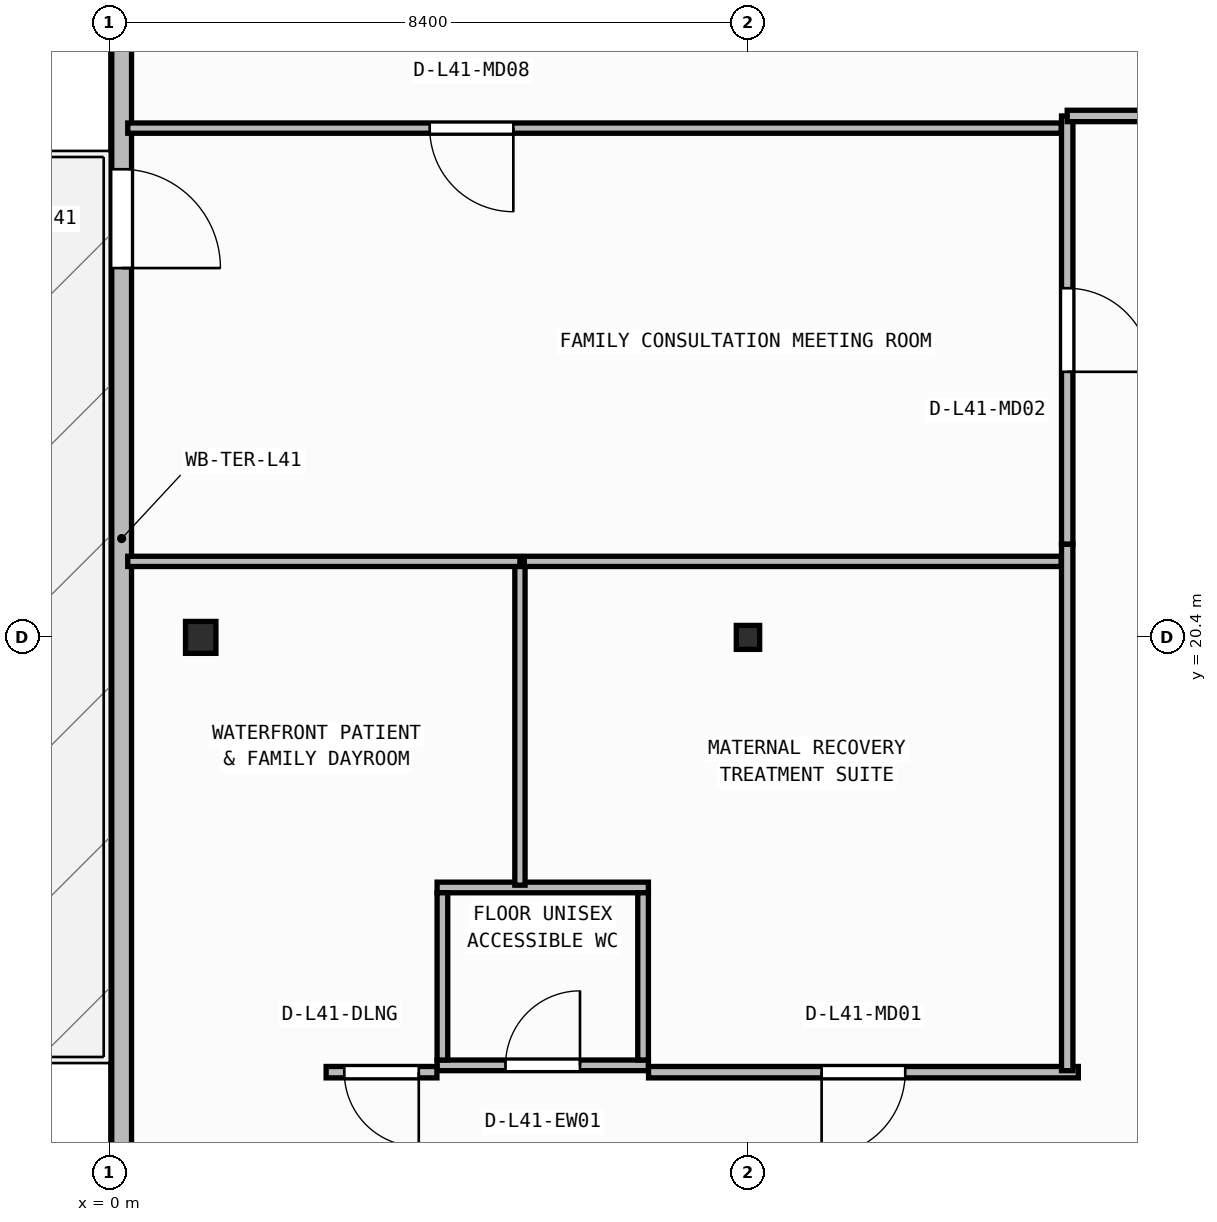
"""IFC4 building model, lengths in metres.
Left out: names, types, materials, properties, quantities, classifications, styles, units other than length and angle.
Written with IfcOpenShell. Run it as: python <this file> out.ifc"""

import sys

from ifc_helpers import new_model, si_unit, direction, frame, frame_2d, origin, origin_2d, place, context, subcontext, project, spatial, rectangle, i_section, extrude, element, fill, save


model = new_model("IFC4")
c1 = context("Model", 3, precision=1e-05, world=origin(), true_north=direction((0.0, 1.0)))
c2 = subcontext(c1, "Body", "Model", "MODEL_VIEW")
j1 = project(units=[si_unit("LENGTHUNIT", "METRE"), si_unit("PLANEANGLEUNIT", "RADIAN")], contexts=[c1])
p1 = place(None, origin())
s1 = spatial("IfcSite", under=j1, at=p1, CompositionType="ELEMENT")
p2 = place(p1, origin())
s2 = spatial("IfcBuilding", under=s1, at=p2, CompositionType="ELEMENT")
p3 = place(p2, frame((0.0, 0.0, 166.55)))
s3 = spatial("IfcBuildingStorey", under=s2, at=p3, CompositionType="ELEMENT", Elevation=166.55)
p4 = place(p3, frame((1.2, 20.4, 0.0), z_axis=(0.0, 0.0, 1.0), x_axis=(1.0, 0.0, 0.0)))
e1 = element("IfcColumn", 1, at=p4, inside=s3, PredefinedType="COLUMN", context=c2, shape_type="SweptSolid", body=[
    extrude(i_section(OverallWidth=0.4, OverallDepth=0.42, WebThickness=0.025, FlangeThickness=0.04, at=origin_2d()), origin(), (0.0, 0.0, 1.0), 3.95),
])
p5 = place(p3, frame((8.4, 20.4, 0.0), z_axis=(0.0, 0.0, 1.0), x_axis=(1.0, 0.0, 0.0)))
e2 = element("IfcColumn", 2, at=p5, inside=s3, PredefinedType="COLUMN", context=c2, shape_type="SweptSolid", body=[
    extrude(i_section(OverallWidth=0.307, OverallDepth=0.315, WebThickness=0.012, FlangeThickness=0.019, FilletRadius=0.017, at=origin_2d()), origin(), (0.0, 0.0, 1.0), 3.95),
])
p6 = place(p3, frame((0.16, 40.64, 0.0), z_axis=(0.0, 0.0, 1.0), x_axis=(0.0, -1.0, 0.0)))
e3 = element("IfcWall", 3, at=p6, inside=s3, PredefinedType="STANDARD", context=c2, shape_type="SweptSolid", body=[
    extrude(rectangle(XDim=37.88, YDim=0.26, at=frame_2d((18.94, 0.0))), origin(), (0.0, 0.0, 1.0), 3.71),
])
p7 = place(p6, frame((14.081, 0.0, 0.0)))
e4 = element("IfcOpeningElement", 4, at=p7, cuts=e3, PredefinedType="OPENING", context=c2, shape_type="SweptSolid", body=[
    extrude(rectangle(XDim=1.3, YDim=2.15, at=frame_2d((0.65, 1.075))), frame((0.0, 0.14, 0.0), z_axis=(0.0, -1.0, 0.0), x_axis=(1.0, 0.0, 0.0)), (0.0, 0.0, 1.0), 0.28),
])
p8 = place(p3, frame((4.31, 14.77, 0.0), z_axis=(0.0, 0.0, 1.0), x_axis=(1.0, 0.0, 0.0)))
e5 = element("IfcWall", 5, at=p8, inside=s3, PredefinedType="PARTITIONING", context=c2, shape_type="SweptSolid", body=[
    extrude(rectangle(XDim=2.78, YDim=0.14, at=frame_2d((1.39, 0.0))), origin(), (0.0, 0.0, 1.0), 3.71),
])
p9 = place(p8, frame((0.9, 0.0, 0.0)))
e6 = element("IfcOpeningElement", 6, at=p9, cuts=e5, PredefinedType="OPENING", context=c2, shape_type="SweptSolid", body=[
    extrude(rectangle(XDim=0.98, YDim=2.1, at=frame_2d((0.49, 1.05))), frame((0.0, 0.08, 0.0), z_axis=(0.0, -1.0, 0.0), x_axis=(1.0, 0.0, 0.0)), (0.0, 0.0, 1.0), 0.16),
])
p10 = place(p3, frame((4.31, 17.11, 0.0), z_axis=(0.0, 0.0, 1.0), x_axis=(1.0, 0.0, 0.0)))
e7 = element("IfcWall", 7, at=p10, inside=s3, PredefinedType="PARTITIONING", context=c2, shape_type="SweptSolid", body=[
    extrude(rectangle(XDim=2.78, YDim=0.14, at=frame_2d((1.39, 0.0))), origin(), (0.0, 0.0, 1.0), 3.71),
])
for number, where, z_axis, x_axis in (
    (8, (4.38, 14.84, 0.0), (0.0, 0.0, 1.0), (0.0, 1.0, 0.0)),
    (9, (7.02, 14.84, 0.0), (0.0, 0.0, 1.0), (0.0, 1.0, 0.0)),
):
    element("IfcWall", number, at=place(p3, frame(where, z_axis=z_axis, x_axis=x_axis)), inside=s3, PredefinedType="PARTITIONING", context=c2, shape_type="SweptSolid", body=[
        extrude(rectangle(XDim=2.2, YDim=0.14, at=frame_2d((1.1, 0.0))), origin(), (0.0, 0.0, 1.0), 3.71),
    ])
p11 = place(p3, frame((4.308, 14.68, 0.0), z_axis=(0.0, 0.0, 1.0), x_axis=(-1.0, 0.0, 0.0)))
e10 = element("IfcWall", 10, at=p11, inside=s3, PredefinedType="PARTITIONING", context=c2, shape_type="SweptSolid", body=[
    extrude(rectangle(XDim=1.458, YDim=0.15, at=frame_2d((0.729, 0.0))), origin(), (0.0, 0.0, 1.0), 3.71),
])
p12 = place(p11, frame((0.239, 0.0, 0.0)))
e11 = element("IfcOpeningElement", 11, at=p12, cuts=e10, PredefinedType="OPENING", context=c2, shape_type="SweptSolid", body=[
    extrude(rectangle(XDim=0.98, YDim=2.1, at=frame_2d((0.49, 1.05))), frame((0.0, 0.085, 0.0), z_axis=(0.0, -1.0, 0.0), x_axis=(1.0, 0.0, 0.0)), (0.0, 0.0, 1.0), 0.17),
])
p13 = place(p3, frame((12.746, 14.68, 0.0), z_axis=(0.0, 0.0, 1.0), x_axis=(-1.0, 0.0, 0.0)))
e12 = element("IfcWall", 12, at=p13, inside=s3, PredefinedType="PARTITIONING", context=c2, shape_type="SweptSolid", body=[
    extrude(rectangle(XDim=5.654, YDim=0.15, at=frame_2d((2.827, 0.0))), origin(), (0.0, 0.0, 1.0), 3.71),
])
p14 = place(p13, frame((2.277, 0.0, 0.0)))
e13 = element("IfcOpeningElement", 13, at=p14, cuts=e12, PredefinedType="OPENING", context=c2, shape_type="SweptSolid", body=[
    extrude(rectangle(XDim=1.1, YDim=2.1, at=frame_2d((0.55, 1.05))), frame((0.0, 0.085, 0.0), z_axis=(0.0, -1.0, 0.0), x_axis=(1.0, 0.0, 0.0)), (0.0, 0.0, 1.0), 0.17),
])
p15 = place(p3, frame((12.6, 21.626, 0.0), z_axis=(0.0, 0.0, 1.0), x_axis=(0.0, -1.0, 0.0)))
e14 = element("IfcWall", 14, at=p15, inside=s3, PredefinedType="PARTITIONING", context=c2, shape_type="SweptSolid", body=[
    extrude(rectangle(XDim=6.926, YDim=0.15, at=frame_2d((3.463, 0.0))), origin(), (0.0, 0.0, 1.0), 3.71),
])
p16 = place(p3, frame((12.6, 27.26, 0.0), z_axis=(0.0, 0.0, 1.0), x_axis=(0.0, -1.0, 0.0)))
e15 = element("IfcWall", 15, at=p16, inside=s3, PredefinedType="PARTITIONING", context=c2, shape_type="SweptSolid", body=[
    extrude(rectangle(XDim=5.632, YDim=0.15, at=frame_2d((2.816, 0.0))), origin(), (0.0, 0.0, 1.0), 3.71),
])
p17 = place(p16, frame((2.266, 0.0, 0.0)))
e16 = element("IfcOpeningElement", 16, at=p17, cuts=e15, PredefinedType="OPENING", context=c2, shape_type="SweptSolid", body=[
    extrude(rectangle(XDim=1.1, YDim=2.1, at=frame_2d((0.55, 1.05))), frame((0.0, 0.085, 0.0), z_axis=(0.0, -1.0, 0.0), x_axis=(1.0, 0.0, 0.0)), (0.0, 0.0, 1.0), 0.17),
])
p18 = place(p3, frame((15.035, 27.26, 0.0), z_axis=(0.0, 0.0, 1.0), x_axis=(-1.0, 0.0, 0.0)))
e17 = element("IfcWall", 17, at=p18, inside=s3, PredefinedType="PARTITIONING", context=c2, shape_type="SweptSolid", body=[
    extrude(rectangle(XDim=2.435, YDim=0.15, at=frame_2d((1.217, 0.0))), origin(), (0.0, 0.0, 1.0), 3.71),
])
p19 = place(p3, frame((5.4, 17.14, 0.0), z_axis=(0.0, 0.0, 1.0), x_axis=(0.0, 1.0, 0.0)))
e18 = element("IfcWall", 18, at=p19, inside=s3, PredefinedType="PARTITIONING", context=c2, shape_type="SweptSolid", body=[
    extrude(rectangle(XDim=4.26, YDim=0.135, at=frame_2d((2.13, 0.0))), origin(), (0.0, 0.0, 1.0), 3.71),
])
p20 = place(p3, frame((5.4, 21.4, 0.0), z_axis=(0.0, 0.0, 1.0), x_axis=(-1.0, 0.0, 0.0)))
e19 = element("IfcWall", 19, at=p20, inside=s3, PredefinedType="PARTITIONING", context=c2, shape_type="SweptSolid", body=[
    extrude(rectangle(XDim=5.16, YDim=0.135, at=frame_2d((2.58, 0.0))), origin(), (0.0, 0.0, 1.0), 3.71),
])
p21 = place(p3, frame((12.52, 21.4, 0.0), z_axis=(0.0, 0.0, 1.0), x_axis=(-1.0, 0.0, 0.0)))
e20 = element("IfcWall", 20, at=p21, inside=s3, PredefinedType="PARTITIONING", context=c2, shape_type="SweptSolid", body=[
    extrude(rectangle(XDim=7.062, YDim=0.135, at=frame_2d((3.531, 0.0))), origin(), (0.0, 0.0, 1.0), 3.71),
])
p22 = place(p3, frame((12.52, 27.1, 0.0), z_axis=(0.0, 0.0, 1.0), x_axis=(-1.0, 0.0, 0.0)))
e21 = element("IfcWall", 21, at=p22, inside=s3, PredefinedType="PARTITIONING", context=c2, shape_type="SweptSolid", body=[
    extrude(rectangle(XDim=12.28, YDim=0.135, at=frame_2d((6.14, 0.0))), origin(), (0.0, 0.0, 1.0), 3.71),
])
p23 = place(p22, frame((7.207, 0.0, 0.0)))
e22 = element("IfcOpeningElement", 22, at=p23, cuts=e21, PredefinedType="OPENING", context=c2, shape_type="SweptSolid", body=[
    extrude(rectangle(XDim=1.1, YDim=2.1, at=frame_2d((0.55, 1.05))), frame((0.0, 0.077, 0.0), z_axis=(0.0, -1.0, 0.0), x_axis=(1.0, 0.0, 0.0)), (0.0, 0.0, 1.0), 0.155),
])
p24 = place(p7, origin())
e23 = element("IfcDoor", 23, at=p24, inside=s3, OperationType="SINGLE_SWING_RIGHT", PredefinedType="DOOR", context=c2, shape_type="SweptSolid", body=[
    extrude(rectangle(XDim=1.3, YDim=2.15, at=frame_2d((0.65, 1.075))), frame((0.0, 0.025, 0.0), z_axis=(0.0, -1.0, 0.0), x_axis=(1.0, 0.0, 0.0)), (0.0, 0.0, 1.0), 0.05),
])
fill(e4, e23)
p25 = place(p9, origin())
e24 = element("IfcDoor", 24, at=p25, inside=s3, OperationType="SINGLE_SWING_RIGHT", PredefinedType="DOOR", context=c2, shape_type="SweptSolid", body=[
    extrude(rectangle(XDim=0.98, YDim=2.1, at=frame_2d((0.49, 1.05))), frame((0.0, 0.025, 0.0), z_axis=(0.0, -1.0, 0.0), x_axis=(1.0, 0.0, 0.0)), (0.0, 0.0, 1.0), 0.05),
])
fill(e6, e24)
p26 = place(p12, origin())
e25 = element("IfcDoor", 25, at=p26, inside=s3, OperationType="SINGLE_SWING_LEFT", PredefinedType="DOOR", context=c2, shape_type="SweptSolid", body=[
    extrude(rectangle(XDim=0.98, YDim=2.1, at=frame_2d((0.49, 1.05))), frame((0.0, 0.025, 0.0), z_axis=(0.0, -1.0, 0.0), x_axis=(1.0, 0.0, 0.0)), (0.0, 0.0, 1.0), 0.05),
])
fill(e11, e25)
p27 = place(p14, origin())
e26 = element("IfcDoor", 26, at=p27, inside=s3, OperationType="SINGLE_SWING_RIGHT", PredefinedType="DOOR", context=c2, shape_type="SweptSolid", body=[
    extrude(rectangle(XDim=1.1, YDim=2.1, at=frame_2d((0.55, 1.05))), frame((0.0, 0.025, 0.0), z_axis=(0.0, -1.0, 0.0), x_axis=(1.0, 0.0, 0.0)), (0.0, 0.0, 1.0), 0.05),
])
fill(e13, e26)
p28 = place(p17, origin())
e27 = element("IfcDoor", 27, at=p28, inside=s3, OperationType="SINGLE_SWING_RIGHT", PredefinedType="DOOR", context=c2, shape_type="SweptSolid", body=[
    extrude(rectangle(XDim=1.1, YDim=2.1, at=frame_2d((0.55, 1.05))), frame((0.0, 0.025, 0.0), z_axis=(0.0, -1.0, 0.0), x_axis=(1.0, 0.0, 0.0)), (0.0, 0.0, 1.0), 0.05),
])
fill(e16, e27)
p29 = place(p23, origin())
e28 = element("IfcDoor", 28, at=p29, inside=s3, OperationType="SINGLE_SWING_LEFT", PredefinedType="DOOR", context=c2, shape_type="SweptSolid", body=[
    extrude(rectangle(XDim=1.1, YDim=2.1, at=frame_2d((0.55, 1.05))), frame((0.0, 0.025, 0.0), z_axis=(0.0, -1.0, 0.0), x_axis=(1.0, 0.0, 0.0)), (0.0, 0.0, 1.0), 0.05),
])
fill(e22, e28)
save(model, sys.argv[1])
